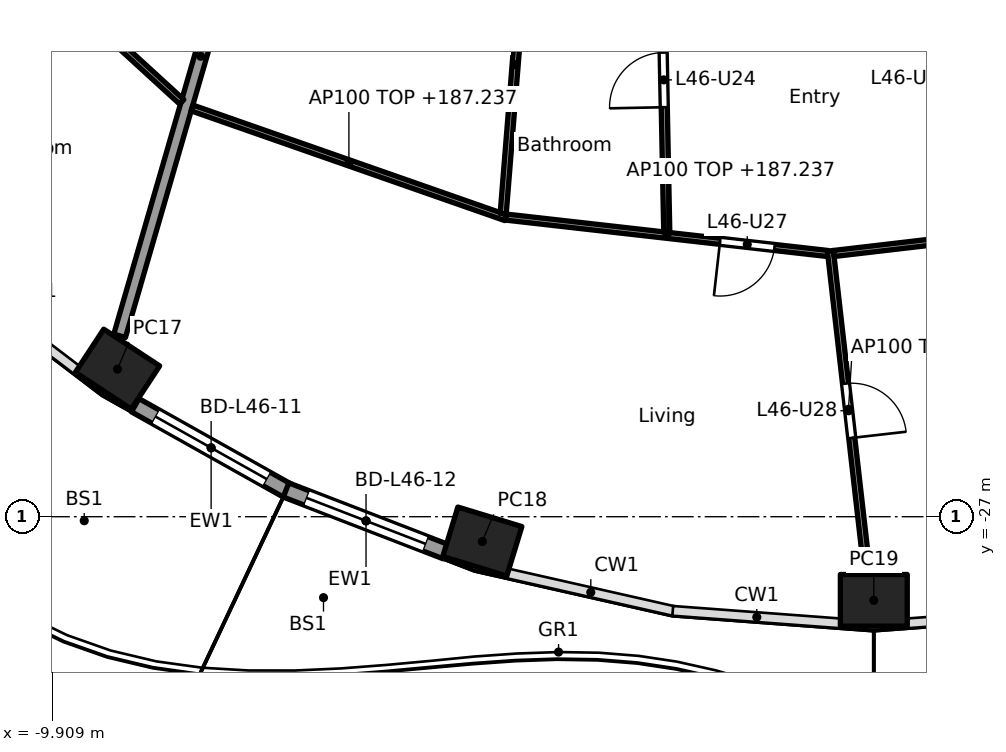
"""IFC4 building model, lengths in metres.
Left out: names, types, materials, properties, quantities, classifications, styles, units other than length and angle.
Written with IfcOpenShell. Run it as: python <this file> out.ifc"""

import sys

from ifc_helpers import new_model, si_unit, direction, frame, frame_2d, origin, origin_2d, place, context, subcontext, project, spatial, rectangle, hollow_rectangle, extrude, element, fill, save


model = new_model("IFC4")
c1 = context("Model", 3, precision=1e-05, world=origin(), true_north=direction((0.0, 1.0)))
c2 = subcontext(c1, "Body", "Model", "MODEL_VIEW")
j1 = project(units=[si_unit("LENGTHUNIT", "METRE"), si_unit("PLANEANGLEUNIT", "RADIAN")], contexts=[c1])
p1 = place(None, origin())
s1 = spatial("IfcSite", under=j1, at=p1, CompositionType="ELEMENT")
p2 = place(p1, origin())
s2 = spatial("IfcBuilding", under=s1, at=p2, CompositionType="ELEMENT")
p3 = place(p2, frame((0.0, 0.0, 184.4)))
s3 = spatial("IfcBuildingStorey", under=s2, at=p3, CompositionType="ELEMENT", Elevation=184.4)
for number, where, z_axis, x_axis in (
    (1, (-8.837, -24.573, 0.0), (0.0, 0.0, 1.0), (0.836, -0.549, 0.0)),
    (2, (-2.838, -27.408, 0.0), (0.0, 0.0, 1.0), (0.957, -0.292, 0.0)),
    (3, (3.6, -28.375, 0.0), (0.0, 0.0, 1.0), (1.0, 0.0, 0.0)),
):
    element("IfcColumn", number, at=place(p3, frame(where, z_axis=z_axis, x_axis=x_axis)), inside=s3, PredefinedType="COLUMN", context=c2, shape_type="SweptSolid", body=[
        extrude(hollow_rectangle(XDim=1.1, YDim=0.85, WallThickness=0.036, at=origin_2d()), origin(), (0.0, 0.0, 1.0), 3.7),
    ])
p4 = place(p3, frame((-6.049, -26.568, 0.0), z_axis=(0.0, 0.0, 1.0), x_axis=(-0.872078262455, 0.489366431371, 0.0)))
e4 = element("IfcWall", 4, at=p4, inside=s3, PredefinedType="SOLIDWALL", context=c2, shape_type="SweptSolid", body=[
    extrude(rectangle(XDim=2.864, YDim=0.25, at=frame_2d((1.432, 0.0))), origin(), (0.0, 0.0, 1.0), 3.44),
])
p5 = place(p4, frame((0.382, 0.0, 0.0)))
e5 = element("IfcOpeningElement", 5, at=p5, cuts=e4, PredefinedType="OPENING", context=c2, shape_type="SweptSolid", body=[
    extrude(rectangle(XDim=2.1, YDim=2.4, at=frame_2d((1.05, 1.2))), frame((0.0, 0.135, 0.0), z_axis=(0.0, -1.0, 0.0), x_axis=(1.0, 0.0, 0.0)), (0.0, 0.0, 1.0), 0.27),
])
p6 = place(p3, frame((-3.436, -27.576, 0.0), z_axis=(0.0, 0.0, 1.0), x_axis=(-0.932795487898, 0.360406128911, 0.0)))
e6 = element("IfcWall", 6, at=p6, inside=s3, PredefinedType="SOLIDWALL", context=c2, shape_type="SweptSolid", body=[
    extrude(rectangle(XDim=2.819, YDim=0.25, at=frame_2d((1.41, 0.0))), origin(), (0.0, 0.0, 1.0), 3.44),
])
p7 = place(p6, frame((0.36, 0.0, 0.0)))
e7 = element("IfcOpeningElement", 7, at=p7, cuts=e6, PredefinedType="OPENING", context=c2, shape_type="SweptSolid", body=[
    extrude(rectangle(XDim=2.1, YDim=2.4, at=frame_2d((1.05, 1.2))), frame((0.0, 0.135, 0.0), z_axis=(0.0, -1.0, 0.0), x_axis=(1.0, 0.0, 0.0)), (0.0, 0.0, 1.0), 0.27),
])
p8 = place(p3, frame((-6.137, -14.83, 0.0), z_axis=(0.0, 0.0, 1.0), x_axis=(-0.278461169897, -0.96044748782, 0.0)))
e8 = element("IfcWall", 8, at=p8, inside=s3, PredefinedType="PARTITIONING", context=c2, shape_type="SweptSolid", body=[
    extrude(rectangle(XDim=9.573, YDim=0.2, at=frame_2d((4.787, 0.0))), origin(), (0.0, 0.0, 1.0), 2.837),
])
p9 = place(p3, frame((-11.766, -16.535, 0.0), z_axis=(0.0, 0.0, 1.0), x_axis=(0.73807320557, -0.674720640872, 0.0)))
e9 = element("IfcWall", 9, at=p9, inside=s3, PredefinedType="PARTITIONING", context=c2, shape_type="SweptSolid", body=[
    extrude(rectangle(XDim=5.399, YDim=0.1, at=frame_2d((2.699, 0.0))), origin(), (0.0, 0.0, 1.0), 2.837),
])
p10 = place(p3, frame((-7.613, -20.278, 0.0), z_axis=(0.0, 0.0, 1.0), x_axis=(0.943918212431, -0.330179357684, 0.0)))
e10 = element("IfcWall", 10, at=p10, inside=s3, PredefinedType="PARTITIONING", context=c2, shape_type="SweptSolid", body=[
    extrude(rectangle(XDim=5.467, YDim=0.1, at=frame_2d((2.734, 0.0))), origin(), (0.0, 0.0, 1.0), 2.837),
])
p11 = place(p3, frame((-2.101, -17.113, 0.0), z_axis=(0.0, 0.0, 1.0), x_axis=(-0.080183022299, -0.996780157776, 0.0)))
e11 = element("IfcWall", 11, at=p11, inside=s3, PredefinedType="PARTITIONING", context=c2, shape_type="SweptSolid", body=[
    extrude(rectangle(XDim=4.92, YDim=0.1, at=frame_2d((2.46, 0.0))), origin(), (0.0, 0.0, 1.0), 3.44),
])
p12 = place(p3, frame((-2.449, -22.073, 0.0), z_axis=(0.0, 0.0, 1.0), x_axis=(0.993660315081, -0.112424099879, 0.0)))
e12 = element("IfcWall", 12, at=p12, inside=s3, PredefinedType="PARTITIONING", context=c2, shape_type="SweptSolid", body=[
    extrude(rectangle(XDim=5.325, YDim=0.1, at=frame_2d((2.662, 0.0))), origin(), (0.0, 0.0, 1.0), 2.837),
])
p13 = place(p12, frame((3.544, 0.0, 0.0)))
e13 = element("IfcOpeningElement", 13, at=p13, cuts=e12, PredefinedType="OPENING", context=c2, shape_type="SweptSolid", body=[
    extrude(rectangle(XDim=0.9, YDim=2.1, at=frame_2d((0.45, 1.05))), frame((0.0, 0.06, 0.0), z_axis=(0.0, -1.0, 0.0), x_axis=(1.0, 0.0, 0.0)), (0.0, 0.0, 1.0), 0.12),
])
p14 = place(p3, frame((0.002, -12.665, 0.0), z_axis=(0.0, 0.0, 1.0), x_axis=(0.019992969345, -0.999800120613, 0.0)))
e14 = element("IfcWall", 14, at=p14, inside=s3, PredefinedType="PARTITIONING", context=c2, shape_type="SweptSolid", body=[
    extrude(rectangle(XDim=9.659, YDim=0.1, at=frame_2d((4.83, 0.0))), origin(), (0.0, 0.0, 1.0), 2.756),
])
p15 = place(p14, frame((1.873, 0.0, 0.0)))
e15 = element("IfcOpeningElement", 15, at=p15, cuts=e14, PredefinedType="OPENING", context=c2, shape_type="SweptSolid", body=[
    extrude(rectangle(XDim=0.9, YDim=2.1, at=frame_2d((0.45, 1.05))), frame((0.0, 0.06, 0.0), z_axis=(0.0, -1.0, 0.0), x_axis=(1.0, 0.0, 0.0)), (0.0, 0.0, 1.0), 0.12),
])
p16 = place(p14, frame((6.703, 0.0, 0.0)))
e16 = element("IfcOpeningElement", 16, at=p16, cuts=e14, PredefinedType="OPENING", context=c2, shape_type="SweptSolid", body=[
    extrude(rectangle(XDim=0.9, YDim=2.1, at=frame_2d((0.45, 1.05))), frame((0.0, 0.06, 0.0), z_axis=(0.0, -1.0, 0.0), x_axis=(1.0, 0.0, 0.0)), (0.0, 0.0, 1.0), 0.12),
])
p17 = place(p3, frame((2.885, -22.627, 0.0), z_axis=(0.0, 0.0, 1.0), x_axis=(0.113634556485, -0.993522615531, 0.0)))
e17 = element("IfcWall", 17, at=p17, inside=s3, PredefinedType="PARTITIONING", context=c2, shape_type="SweptSolid", body=[
    extrude(rectangle(XDim=5.244, YDim=0.1, at=frame_2d((2.622, 0.0))), origin(), (0.0, 0.0, 1.0), 2.837),
])
p18 = place(p17, frame((2.197, 0.0, 0.0)))
e18 = element("IfcOpeningElement", 18, at=p18, cuts=e17, PredefinedType="OPENING", context=c2, shape_type="SweptSolid", body=[
    extrude(rectangle(XDim=0.9, YDim=2.1, at=frame_2d((0.45, 1.05))), frame((0.0, 0.06, 0.0), z_axis=(0.0, -1.0, 0.0), x_axis=(1.0, 0.0, 0.0)), (0.0, 0.0, 1.0), 0.12),
])
p19 = place(p3, frame((2.941, -22.671, 0.0), z_axis=(0.0, 0.0, 1.0), x_axis=(0.993245806382, 0.1160291692, 0.0)))
e19 = element("IfcWall", 19, at=p19, inside=s3, PredefinedType="PARTITIONING", context=c2, shape_type="SweptSolid", body=[
    extrude(rectangle(XDim=5.408, YDim=0.1, at=frame_2d((2.704, 0.0))), origin(), (0.0, 0.0, 1.0), 2.837),
])
p20 = place(p3, frame((3.491, -12.662, 0.0), z_axis=(0.0, 0.0, 1.0), x_axis=(0.215082442833, -0.976595895335, 0.0)))
e20 = element("IfcWall", 20, at=p20, inside=s3, PredefinedType="PARTITIONING", context=c2, shape_type="SweptSolid", body=[
    extrude(rectangle(XDim=9.878, YDim=0.1, at=frame_2d((4.939, 0.0))), origin(), (0.0, 0.0, 1.0), 2.756),
])
p21 = place(p20, frame((0.35, 0.0, 0.0)))
e21 = element("IfcOpeningElement", 21, at=p21, cuts=e20, PredefinedType="OPENING", context=c2, shape_type="SweptSolid", body=[
    extrude(rectangle(XDim=0.9, YDim=2.1, at=frame_2d((0.45, 1.05))), frame((0.0, 0.06, 0.0), z_axis=(0.0, -1.0, 0.0), x_axis=(1.0, 0.0, 0.0)), (0.0, 0.0, 1.0), 0.12),
])
p22 = place(p20, frame((6.861, 0.0, 0.0)))
e22 = element("IfcOpeningElement", 22, at=p22, cuts=e20, PredefinedType="OPENING", context=c2, shape_type="SweptSolid", body=[
    extrude(rectangle(XDim=0.9, YDim=2.1, at=frame_2d((0.45, 1.05))), frame((0.0, 0.06, 0.0), z_axis=(0.0, -1.0, 0.0), x_axis=(1.0, 0.0, 0.0)), (0.0, 0.0, 1.0), 0.12),
])
p23 = place(p5, origin())
e23 = element("IfcDoor", 23, at=p23, inside=s3, OperationType="SLIDING_TO_LEFT", PredefinedType="DOOR", context=c2, shape_type="SweptSolid", body=[
    extrude(rectangle(XDim=2.1, YDim=2.4, at=frame_2d((1.05, 1.2))), frame((0.0, 0.025, 0.0), z_axis=(0.0, -1.0, 0.0), x_axis=(1.0, 0.0, 0.0)), (0.0, 0.0, 1.0), 0.05),
])
fill(e5, e23)
p24 = place(p7, origin())
e24 = element("IfcDoor", 24, at=p24, inside=s3, OperationType="SLIDING_TO_LEFT", PredefinedType="DOOR", context=c2, shape_type="SweptSolid", body=[
    extrude(rectangle(XDim=2.1, YDim=2.4, at=frame_2d((1.05, 1.2))), frame((0.0, 0.025, 0.0), z_axis=(0.0, -1.0, 0.0), x_axis=(1.0, 0.0, 0.0)), (0.0, 0.0, 1.0), 0.05),
])
fill(e7, e24)
p25 = place(p16, frame((0.9, 0.0, 0.0), x_axis=(-1.0, 0.0, 0.0)))
e25 = element("IfcDoor", 25, at=p25, inside=s3, OperationType="SINGLE_SWING_LEFT", PredefinedType="DOOR", context=c2, shape_type="SweptSolid", body=[
    extrude(rectangle(XDim=0.9, YDim=2.1, at=frame_2d((0.45, 1.05))), frame((0.0, 0.025, 0.0), z_axis=(0.0, -1.0, 0.0), x_axis=(1.0, 0.0, 0.0)), (0.0, 0.0, 1.0), 0.05),
])
fill(e16, e25)
p26 = place(p13, frame((0.9, 0.0, 0.0), x_axis=(-1.0, 0.0, 0.0)))
e26 = element("IfcDoor", 26, at=p26, inside=s3, OperationType="SINGLE_SWING_RIGHT", PredefinedType="DOOR", context=c2, shape_type="SweptSolid", body=[
    extrude(rectangle(XDim=0.9, YDim=2.1, at=frame_2d((0.45, 1.05))), frame((0.0, 0.025, 0.0), z_axis=(0.0, -1.0, 0.0), x_axis=(1.0, 0.0, 0.0)), (0.0, 0.0, 1.0), 0.05),
])
fill(e13, e26)
p27 = place(p18, origin())
e27 = element("IfcDoor", 27, at=p27, inside=s3, OperationType="SINGLE_SWING_RIGHT", PredefinedType="DOOR", context=c2, shape_type="SweptSolid", body=[
    extrude(rectangle(XDim=0.9, YDim=2.1, at=frame_2d((0.45, 1.05))), frame((0.0, 0.025, 0.0), z_axis=(0.0, -1.0, 0.0), x_axis=(1.0, 0.0, 0.0)), (0.0, 0.0, 1.0), 0.05),
])
fill(e18, e27)
save(model, sys.argv[1])
